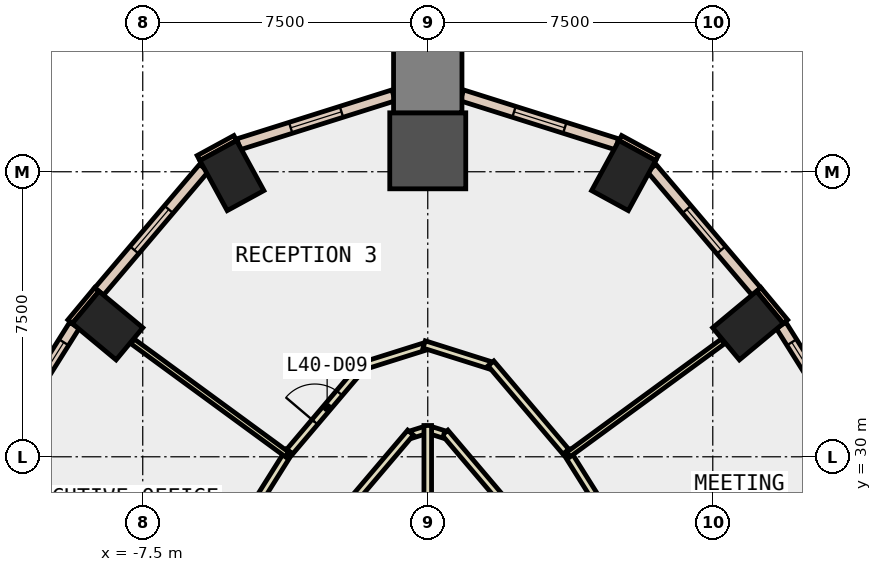
"""IFC4 building model, lengths in metres.
Left out: names, types, materials, properties, quantities, classifications, styles, units other than length and angle.
Written with IfcOpenShell. Run it as: python <this file> out.ifc"""

import sys

from ifc_helpers import new_model, si_unit, direction, frame, frame_2d, origin, origin_2d, place, context, subcontext, project, spatial, rectangle, extrude, element, fill, save


model = new_model("IFC4")
c1 = context("Model", 3, precision=1e-05, world=origin(), true_north=direction((0.0, 1.0)))
c2 = subcontext(c1, "Body", "Model", "MODEL_VIEW")
j1 = project(units=[si_unit("LENGTHUNIT", "METRE"), si_unit("PLANEANGLEUNIT", "RADIAN")], contexts=[c1])
p1 = place(None, origin())
s1 = spatial("IfcSite", under=j1, at=p1, CompositionType="ELEMENT")
p2 = place(p1, origin())
s2 = spatial("IfcBuilding", under=s1, at=p2, CompositionType="ELEMENT")
p3 = place(p2, frame((0.0, 0.0, 180.2)))
s3 = spatial("IfcBuildingStorey", under=s2, at=p3, CompositionType="ELEMENT", Elevation=180.2)
for number, where, z_axis, x_axis in (
    (1, (8.426, 33.452, -0.4), (0.0, 0.0, 1.0), (-0.639, 0.769, 0.0)),
    (2, (5.154, 37.399, -0.4), (0.0, 0.0, 1.0), (-0.878, 0.479, 0.0)),
):
    element("IfcColumn", number, at=place(p3, frame(where, z_axis=z_axis, x_axis=x_axis)), inside=s3, PredefinedType="COLUMN", context=c2, shape_type="SweptSolid", body=[
        extrude(rectangle(XDim=1.1, YDim=1.5, at=origin_2d()), origin(), (0.0, 0.0, 1.0), 4.0),
    ])
p4 = place(p3, frame((0.0, 38.051, -0.4), z_axis=(0.0, 0.0, 1.0), x_axis=(0.0, 1.0, 0.0)))
e3 = element("IfcColumn", 3, at=p4, inside=s3, PredefinedType="COLUMN", context=c2, shape_type="SweptSolid", body=[
    extrude(rectangle(XDim=2.0, YDim=2.0, at=origin_2d()), origin(), (0.0, 0.0, 1.0), 4.0),
])
for number, where, z_axis, x_axis in (
    (4, (-5.154, 37.399, -0.4), (0.0, 0.0, 1.0), (0.878, 0.479, 0.0)),
    (5, (-8.426, 33.452, -0.4), (0.0, 0.0, 1.0), (0.639, 0.769, 0.0)),
):
    element("IfcColumn", number, at=place(p3, frame(where, z_axis=z_axis, x_axis=x_axis)), inside=s3, PredefinedType="COLUMN", context=c2, shape_type="SweptSolid", body=[
        extrude(rectangle(XDim=1.1, YDim=1.5, at=origin_2d()), origin(), (0.0, 0.0, 1.0), 4.0),
    ])
p5 = place(p3, frame((0.0, 39.951, -0.4), z_axis=(0.0, 0.0, 1.0), x_axis=(0.0, 1.0, 0.0)))
e6 = element("IfcColumn", 6, at=p5, inside=s3, PredefinedType="COLUMN", context=c2, shape_type="SweptSolid", body=[
    extrude(rectangle(XDim=1.8, YDim=1.8, at=origin_2d()), origin(), (0.0, 0.0, 1.0), 4.0),
])
for number, where, z_axis, x_axis in (
    (7, (6.032, 37.86, 0.0), (0.0, 0.0, 1.0), (-0.878, 0.479, 0.0)),
    (8, (-5.066, 38.387, 0.0), (0.0, 0.0, 1.0), (-0.878, -0.479, 0.0)),
):
    element("IfcWall", number, at=place(p3, frame(where, z_axis=z_axis, x_axis=x_axis)), inside=s3, PredefinedType="STANDARD", context=c2, shape_type="SweptSolid", body=[
        extrude(rectangle(XDim=1.1, YDim=0.15, at=frame_2d((0.55, 0.0))), origin(), (0.0, 0.0, 1.0), 3.6),
    ])
for number, where, z_axis, x_axis in (
    (9, (9.412, 33.556, 0.0), (0.0, 0.0, 1.0), (-0.639, 0.769, 0.0)),
    (10, (-8.709, 34.402, 0.0), (0.0, 0.0, 1.0), (-0.639, -0.769, 0.0)),
):
    element("IfcWall", number, at=place(p3, frame(where, z_axis=z_axis, x_axis=x_axis)), inside=s3, PredefinedType="STANDARD", context=c2, shape_type="SweptSolid", body=[
        extrude(rectangle(XDim=1.1, YDim=0.15, at=frame_2d((0.55, 0.0))), origin(), (0.0, 0.0, 1.0), 3.6),
    ])
p6 = place(p3, frame((12.55, 28.279, 0.0), z_axis=(0.0, 0.0, 1.0), x_axis=(-0.531816047834, 0.846859900613, 0.0)))
e11 = element("IfcWall", 11, at=p6, inside=s3, PredefinedType="STANDARD", context=c2, shape_type="SweptSolid", body=[
    extrude(rectangle(XDim=6.119, YDim=0.3, at=frame_2d((3.06, 0.0))), origin(), (0.0, 0.0, 1.0), 3.6),
])
p7 = place(p6, frame((0.53, 0.0, 0.9)))
e12 = element("IfcOpeningElement", 12, at=p7, cuts=e11, PredefinedType="OPENING", context=c2, shape_type="SweptSolid", body=[
    extrude(rectangle(XDim=2.0, YDim=2.6, at=frame_2d((1.0, 1.3))), frame((0.0, 0.16, 0.0), z_axis=(0.0, -1.0, 0.0), x_axis=(1.0, 0.0, 0.0)), (0.0, 0.0, 1.0), 0.32),
])
p8 = place(p6, frame((3.589, 0.0, 0.9)))
e13 = element("IfcOpeningElement", 13, at=p8, cuts=e11, PredefinedType="OPENING", context=c2, shape_type="SweptSolid", body=[
    extrude(rectangle(XDim=2.0, YDim=2.6, at=frame_2d((1.0, 1.3))), frame((0.0, 0.16, 0.0), z_axis=(0.0, -1.0, 0.0), x_axis=(1.0, 0.0, 0.0)), (0.0, 0.0, 1.0), 0.32),
])
p9 = place(p3, frame((8.647, 34.35, 0.0), z_axis=(0.0, 0.0, 1.0), x_axis=(-0.647156077277, 0.76235753531, 0.0)))
e14 = element("IfcWall", 14, at=p9, inside=s3, PredefinedType="STANDARD", context=c2, shape_type="SweptSolid", body=[
    extrude(rectangle(XDim=4.262, YDim=0.3, at=frame_2d((2.131, 0.0))), origin(), (0.0, 0.0, 1.0), 3.6),
])
p10 = place(p9, frame((1.431, 0.0, 0.9)))
e15 = element("IfcOpeningElement", 15, at=p10, cuts=e14, PredefinedType="OPENING", context=c2, shape_type="SweptSolid", body=[
    extrude(rectangle(XDim=1.4, YDim=2.6, at=frame_2d((0.7, 1.3))), frame((0.0, 0.16, 0.0), z_axis=(0.0, -1.0, 0.0), x_axis=(1.0, 0.0, 0.0)), (0.0, 0.0, 1.0), 0.32),
])
p11 = place(p3, frame((4.978, 38.223, 0.0), z_axis=(0.0, 0.0, 1.0), x_axis=(-0.953651650729, 0.300912826349, 0.0)))
e16 = element("IfcWall", 16, at=p11, inside=s3, PredefinedType="STANDARD", context=c2, shape_type="SweptSolid", body=[
    extrude(rectangle(XDim=4.277, YDim=0.3, at=frame_2d((2.139, 0.0))), origin(), (0.0, 0.0, 1.0), 3.6),
])
p12 = place(p11, frame((1.439, 0.0, 0.9)))
e17 = element("IfcOpeningElement", 17, at=p12, cuts=e16, PredefinedType="OPENING", context=c2, shape_type="SweptSolid", body=[
    extrude(rectangle(XDim=1.4, YDim=2.6, at=frame_2d((0.7, 1.3))), frame((0.0, 0.16, 0.0), z_axis=(0.0, -1.0, 0.0), x_axis=(1.0, 0.0, 0.0)), (0.0, 0.0, 1.0), 0.32),
])
p13 = place(p3, frame((-0.899, 39.51, 0.0), z_axis=(0.0, 0.0, 1.0), x_axis=(-0.953651650729, -0.300912826349, 0.0)))
e18 = element("IfcWall", 18, at=p13, inside=s3, PredefinedType="STANDARD", context=c2, shape_type="SweptSolid", body=[
    extrude(rectangle(XDim=4.277, YDim=0.3, at=frame_2d((2.139, 0.0))), origin(), (0.0, 0.0, 1.0), 3.6),
])
p14 = place(p13, frame((1.439, 0.0, 0.9)))
e19 = element("IfcOpeningElement", 19, at=p14, cuts=e18, PredefinedType="OPENING", context=c2, shape_type="SweptSolid", body=[
    extrude(rectangle(XDim=1.4, YDim=2.6, at=frame_2d((0.7, 1.3))), frame((0.0, 0.16, 0.0), z_axis=(0.0, -1.0, 0.0), x_axis=(1.0, 0.0, 0.0)), (0.0, 0.0, 1.0), 0.32),
])
p15 = place(p3, frame((-5.889, 37.599, 0.0), z_axis=(0.0, 0.0, 1.0), x_axis=(-0.647156077277, -0.76235753531, 0.0)))
e20 = element("IfcWall", 20, at=p15, inside=s3, PredefinedType="STANDARD", context=c2, shape_type="SweptSolid", body=[
    extrude(rectangle(XDim=4.262, YDim=0.3, at=frame_2d((2.131, 0.0))), origin(), (0.0, 0.0, 1.0), 3.6),
])
p16 = place(p15, frame((1.431, 0.0, 0.9)))
e21 = element("IfcOpeningElement", 21, at=p16, cuts=e20, PredefinedType="OPENING", context=c2, shape_type="SweptSolid", body=[
    extrude(rectangle(XDim=1.4, YDim=2.6, at=frame_2d((0.7, 1.3))), frame((0.0, 0.16, 0.0), z_axis=(0.0, -1.0, 0.0), x_axis=(1.0, 0.0, 0.0)), (0.0, 0.0, 1.0), 0.32),
])
p17 = place(p3, frame((-9.296, 33.461, 0.0), z_axis=(0.0, 0.0, 1.0), x_axis=(-0.531816047834, -0.846859900613, 0.0)))
e22 = element("IfcWall", 22, at=p17, inside=s3, PredefinedType="STANDARD", context=c2, shape_type="SweptSolid", body=[
    extrude(rectangle(XDim=6.119, YDim=0.3, at=frame_2d((3.06, 0.0))), origin(), (0.0, 0.0, 1.0), 3.6),
])
p18 = place(p17, frame((0.53, 0.0, 0.9)))
e23 = element("IfcOpeningElement", 23, at=p18, cuts=e22, PredefinedType="OPENING", context=c2, shape_type="SweptSolid", body=[
    extrude(rectangle(XDim=2.0, YDim=2.6, at=frame_2d((1.0, 1.3))), frame((0.0, 0.16, 0.0), z_axis=(0.0, -1.0, 0.0), x_axis=(1.0, 0.0, 0.0)), (0.0, 0.0, 1.0), 0.32),
])
p19 = place(p17, frame((3.589, 0.0, 0.9)))
e24 = element("IfcOpeningElement", 24, at=p19, cuts=e22, PredefinedType="OPENING", context=c2, shape_type="SweptSolid", body=[
    extrude(rectangle(XDim=2.0, YDim=2.6, at=frame_2d((1.0, 1.3))), frame((0.0, 0.16, 0.0), z_axis=(0.0, -1.0, 0.0), x_axis=(1.0, 0.0, 0.0)), (0.0, 0.0, 1.0), 0.32),
])
p20 = place(p3, frame((1.936, 28.89, 0.0), z_axis=(0.0, 0.0, 1.0), x_axis=(-0.647388540773, 0.762160138866, 0.0)))
e25 = element("IfcWall", 25, at=p20, inside=s3, PredefinedType="PARTITIONING", context=c2, shape_type="SweptSolid", body=[
    extrude(rectangle(XDim=2.291, YDim=0.2, at=frame_2d((1.146, 0.0))), origin(), (0.0, 0.0, 1.0), 3.6),
])
p21 = place(p3, frame((0.423, 30.59, 0.0), z_axis=(0.0, 0.0, 1.0), x_axis=(-0.954074901128, 0.29956816092, 0.0)))
e26 = element("IfcWall", 26, at=p21, inside=s3, PredefinedType="PARTITIONING", context=c2, shape_type="SweptSolid", body=[
    extrude(rectangle(XDim=0.344, YDim=0.2, at=frame_2d((0.172, 0.0))), origin(), (0.0, 0.0, 1.0), 3.6),
])
p22 = place(p3, frame((-0.048, 30.708, 0.0), z_axis=(0.0, 0.0, 1.0), x_axis=(-0.953948026088, -0.299971937891, 0.0)))
e27 = element("IfcWall", 27, at=p22, inside=s3, PredefinedType="PARTITIONING", context=c2, shape_type="SweptSolid", body=[
    extrude(rectangle(XDim=0.393, YDim=0.2, at=frame_2d((0.197, 0.0))), origin(), (0.0, 0.0, 1.0), 3.6),
])
p23 = place(p3, frame((-0.453, 30.636, 0.0), z_axis=(0.0, 0.0, 1.0), x_axis=(-0.647388540773, -0.762160138866, 0.0)))
e28 = element("IfcWall", 28, at=p23, inside=s3, PredefinedType="PARTITIONING", context=c2, shape_type="SweptSolid", body=[
    extrude(rectangle(XDim=2.291, YDim=0.2, at=frame_2d((1.146, 0.0))), origin(), (0.0, 0.0, 1.0), 3.6),
])
p24 = place(p3, frame((3.646, 30.142, 0.0), z_axis=(0.0, 0.0, 1.0), x_axis=(0.531621424046, -0.846982090422, 0.0)))
e29 = element("IfcWall", 29, at=p24, inside=s3, PredefinedType="PARTITIONING", context=c2, shape_type="SweptSolid", body=[
    extrude(rectangle(XDim=6.745, YDim=0.2, at=frame_2d((3.373, 0.0))), origin(), (0.0, 0.0, 1.0), 3.6),
])
p25 = place(p24, frame((2.948, 0.0, 0.0)))
e30 = element("IfcOpeningElement", 30, at=p25, cuts=e29, PredefinedType="OPENING", context=c2, shape_type="SweptSolid", body=[
    extrude(rectangle(XDim=1.0, YDim=2.1, at=frame_2d((0.5, 1.05))), frame((0.0, 0.11, 0.0), z_axis=(0.0, -1.0, 0.0), x_axis=(1.0, 0.0, 0.0)), (0.0, 0.0, 1.0), 0.22),
])
p26 = place(p3, frame((-3.634, 30.134, 0.0), z_axis=(0.0, 0.0, 1.0), x_axis=(0.647148242723, 0.762364185899, 0.0)))
e31 = element("IfcWall", 31, at=p26, inside=s3, PredefinedType="PARTITIONING", context=c2, shape_type="SweptSolid", body=[
    extrude(rectangle(XDim=3.047, YDim=0.2, at=frame_2d((1.523, 0.0))), origin(), (0.0, 0.0, 1.0), 3.6),
])
p27 = place(p26, frame((1.024, 0.0, 0.0)))
e32 = element("IfcOpeningElement", 32, at=p27, cuts=e31, PredefinedType="OPENING", context=c2, shape_type="SweptSolid", body=[
    extrude(rectangle(XDim=1.0, YDim=2.1, at=frame_2d((0.5, 1.05))), frame((0.0, 0.11, 0.0), z_axis=(0.0, -1.0, 0.0), x_axis=(1.0, 0.0, 0.0)), (0.0, 0.0, 1.0), 0.22),
])
p28 = place(p3, frame((-1.632, 32.411, 0.0), z_axis=(0.0, 0.0, 1.0), x_axis=(0.953809064266, 0.300413496575, 0.0)))
e33 = element("IfcWall", 33, at=p28, inside=s3, PredefinedType="PARTITIONING", context=c2, shape_type="SweptSolid", body=[
    extrude(rectangle(XDim=1.612, YDim=0.2, at=frame_2d((0.806, 0.0))), origin(), (0.0, 0.0, 1.0), 3.6),
])
p29 = place(p3, frame((-0.095, 32.956, 0.0), z_axis=(0.0, 0.0, 1.0), x_axis=(0.953617294109, -0.301021687552, 0.0)))
e34 = element("IfcWall", 34, at=p29, inside=s3, PredefinedType="PARTITIONING", context=c2, shape_type="SweptSolid", body=[
    extrude(rectangle(XDim=1.811, YDim=0.2, at=frame_2d((0.906, 0.0))), origin(), (0.0, 0.0, 1.0), 3.6),
])
p30 = place(p3, frame((1.662, 32.457, 0.0), z_axis=(0.0, 0.0, 1.0), x_axis=(0.647148242723, -0.762364185899, 0.0)))
e35 = element("IfcWall", 35, at=p30, inside=s3, PredefinedType="PARTITIONING", context=c2, shape_type="SweptSolid", body=[
    extrude(rectangle(XDim=3.047, YDim=0.2, at=frame_2d((1.523, 0.0))), origin(), (0.0, 0.0, 1.0), 3.6),
])
p31 = place(p3, frame((-7.312, 24.302, 0.0), z_axis=(0.0, 0.0, 1.0), x_axis=(0.53166241737, 0.846956358944, 0.0)))
e36 = element("IfcWall", 36, at=p31, inside=s3, PredefinedType="PARTITIONING", context=c2, shape_type="SweptSolid", body=[
    extrude(rectangle(XDim=6.895, YDim=0.2, at=frame_2d((3.448, 0.0))), origin(), (0.0, 0.0, 1.0), 3.6),
])
p32 = place(p31, frame((2.948, 0.0, 0.0)))
e37 = element("IfcOpeningElement", 37, at=p32, cuts=e36, PredefinedType="OPENING", context=c2, shape_type="SweptSolid", body=[
    extrude(rectangle(XDim=1.0, YDim=2.1, at=frame_2d((0.5, 1.05))), frame((0.0, 0.11, 0.0), z_axis=(0.0, -1.0, 0.0), x_axis=(1.0, 0.0, 0.0)), (0.0, 0.0, 1.0), 0.22),
])
p33 = place(p3, frame((0.0, 23.5, 0.0), z_axis=(0.0, 0.0, 1.0), x_axis=(0.0, 1.0, 0.0)))
e38 = element("IfcWall", 38, at=p33, inside=s3, PredefinedType="PARTITIONING", context=c2, shape_type="SweptSolid", body=[
    extrude(rectangle(XDim=7.323, YDim=0.2, at=frame_2d((3.662, 0.0))), origin(), (0.0, 0.0, 1.0), 3.6),
])
for number, where, z_axis, x_axis in (
    (39, (3.699, 30.058, 0.0), (0.0, 0.0, 1.0), (0.807, 0.591, 0.0)),
    (40, (-3.699, 30.058, 0.0), (0.0, 0.0, 1.0), (-0.807, 0.591, 0.0)),
):
    element("IfcWall", number, at=place(p3, frame(where, z_axis=z_axis, x_axis=x_axis)), inside=s3, PredefinedType="PARTITIONING", context=c2, shape_type="SweptSolid", body=[
        extrude(rectangle(XDim=5.044, YDim=0.15, at=frame_2d((2.522, 0.0))), origin(), (0.0, 0.0, 1.0), 3.6),
    ])
p34 = place(p8, origin())
e41 = element("IfcWindow", 41, at=p34, inside=s3, PartitioningType="SINGLE_PANEL", PredefinedType="WINDOW", context=c2, shape_type="SweptSolid", body=[
    extrude(rectangle(XDim=2.0, YDim=2.6, at=frame_2d((1.0, 1.3))), frame((0.0, 0.03, 0.0), z_axis=(0.0, -1.0, 0.0), x_axis=(1.0, 0.0, 0.0)), (0.0, 0.0, 1.0), 0.06),
])
fill(e13, e41)
p35 = place(p10, origin())
e42 = element("IfcWindow", 42, at=p35, inside=s3, PartitioningType="SINGLE_PANEL", PredefinedType="WINDOW", context=c2, shape_type="SweptSolid", body=[
    extrude(rectangle(XDim=1.4, YDim=2.6, at=frame_2d((0.7, 1.3))), frame((0.0, 0.03, 0.0), z_axis=(0.0, -1.0, 0.0), x_axis=(1.0, 0.0, 0.0)), (0.0, 0.0, 1.0), 0.06),
])
fill(e15, e42)
p36 = place(p12, origin())
e43 = element("IfcWindow", 43, at=p36, inside=s3, PartitioningType="SINGLE_PANEL", PredefinedType="WINDOW", context=c2, shape_type="SweptSolid", body=[
    extrude(rectangle(XDim=1.4, YDim=2.6, at=frame_2d((0.7, 1.3))), frame((0.0, 0.03, 0.0), z_axis=(0.0, -1.0, 0.0), x_axis=(1.0, 0.0, 0.0)), (0.0, 0.0, 1.0), 0.06),
])
fill(e17, e43)
p37 = place(p14, origin())
e44 = element("IfcWindow", 44, at=p37, inside=s3, PartitioningType="SINGLE_PANEL", PredefinedType="WINDOW", context=c2, shape_type="SweptSolid", body=[
    extrude(rectangle(XDim=1.4, YDim=2.6, at=frame_2d((0.7, 1.3))), frame((0.0, 0.03, 0.0), z_axis=(0.0, -1.0, 0.0), x_axis=(1.0, 0.0, 0.0)), (0.0, 0.0, 1.0), 0.06),
])
fill(e19, e44)
p38 = place(p16, origin())
e45 = element("IfcWindow", 45, at=p38, inside=s3, PartitioningType="SINGLE_PANEL", PredefinedType="WINDOW", context=c2, shape_type="SweptSolid", body=[
    extrude(rectangle(XDim=1.4, YDim=2.6, at=frame_2d((0.7, 1.3))), frame((0.0, 0.03, 0.0), z_axis=(0.0, -1.0, 0.0), x_axis=(1.0, 0.0, 0.0)), (0.0, 0.0, 1.0), 0.06),
])
fill(e21, e45)
p39 = place(p18, origin())
e46 = element("IfcWindow", 46, at=p39, inside=s3, PartitioningType="SINGLE_PANEL", PredefinedType="WINDOW", context=c2, shape_type="SweptSolid", body=[
    extrude(rectangle(XDim=2.0, YDim=2.6, at=frame_2d((1.0, 1.3))), frame((0.0, 0.03, 0.0), z_axis=(0.0, -1.0, 0.0), x_axis=(1.0, 0.0, 0.0)), (0.0, 0.0, 1.0), 0.06),
])
fill(e23, e46)
p40 = place(p27, origin())
e47 = element("IfcDoor", 47, at=p40, inside=s3, OperationType="SINGLE_SWING_LEFT", PredefinedType="DOOR", context=c2, shape_type="SweptSolid", body=[
    extrude(rectangle(XDim=1.0, YDim=2.1, at=frame_2d((0.5, 1.05))), frame((0.0, 0.025, 0.0), z_axis=(0.0, -1.0, 0.0), x_axis=(1.0, 0.0, 0.0)), (0.0, 0.0, 1.0), 0.05),
])
fill(e32, e47)
save(model, sys.argv[1])
